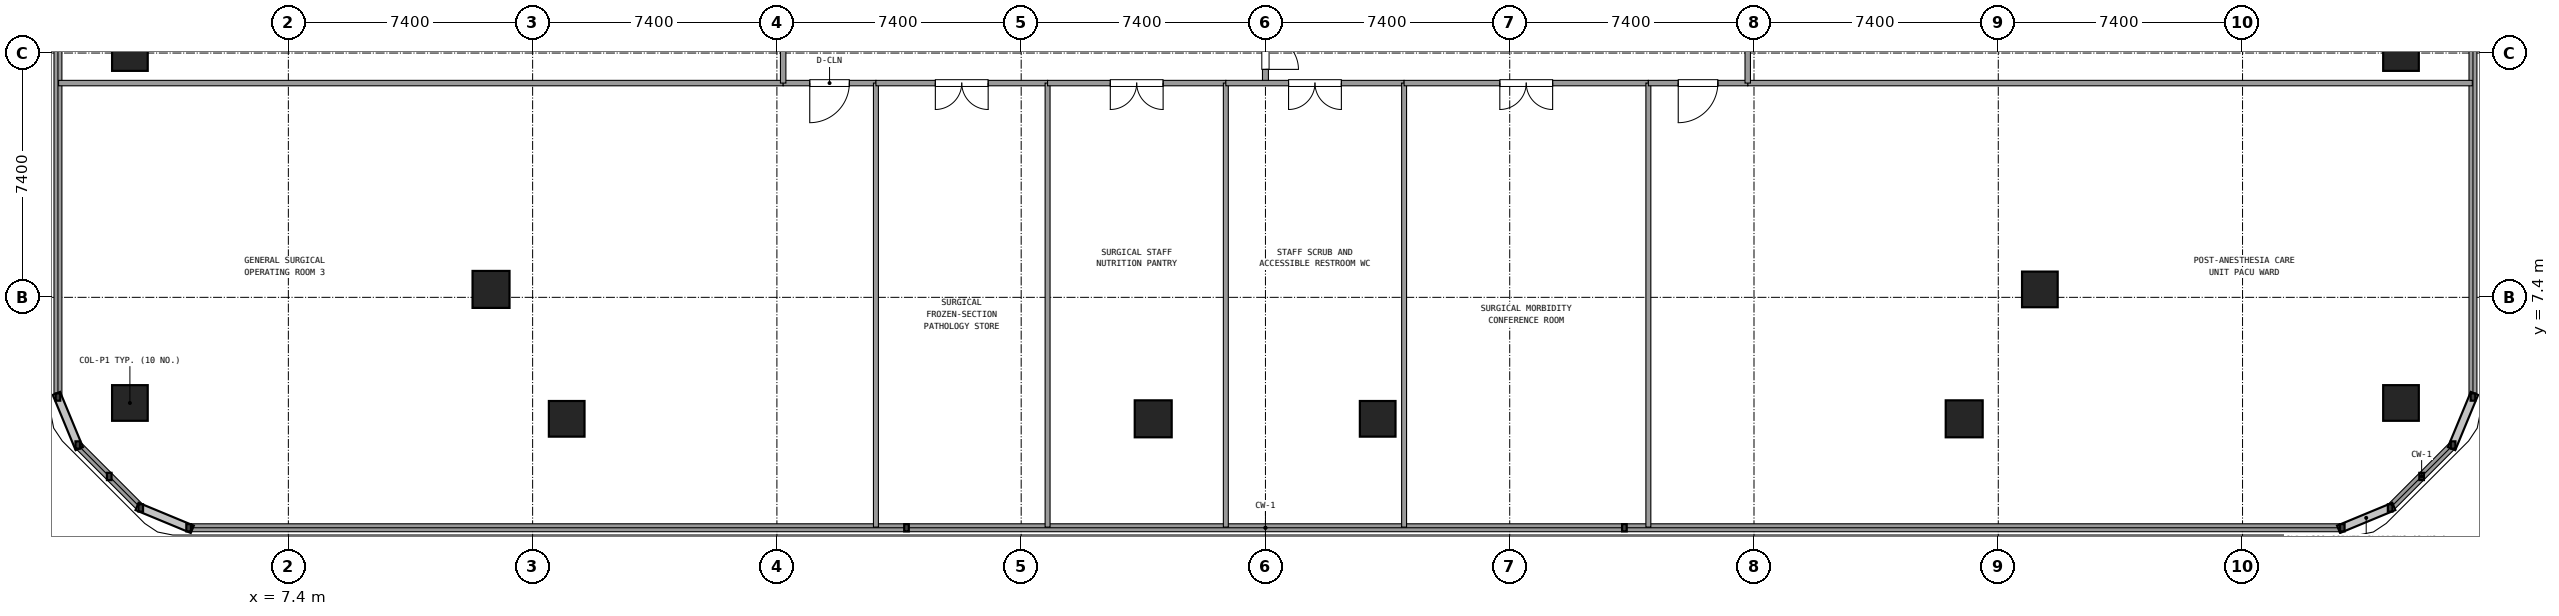
"""IFC4 building model, lengths in metres.
Left out: names, types, materials, properties, quantities, classifications, styles, units other than length and angle.
Written with IfcOpenShell. Run it as: python <this file> out.ifc"""

import sys

from ifc_helpers import new_model, si_unit, direction, frame, frame_2d, origin, origin_2d, place, context, subcontext, project, spatial, rectangle, circle, extrude, element, fill, save


model = new_model("IFC4")
c1 = context("Model", 3, precision=1e-05, world=origin(), true_north=direction((0.0, 1.0)))
c2 = subcontext(c1, "Body", "Model", "MODEL_VIEW")
j1 = project(units=[si_unit("LENGTHUNIT", "METRE"), si_unit("PLANEANGLEUNIT", "RADIAN")], contexts=[c1])
p1 = place(None, origin())
s1 = spatial("IfcSite", under=j1, at=p1, CompositionType="ELEMENT")
p2 = place(p1, origin())
s2 = spatial("IfcBuilding", under=s1, at=p2, CompositionType="ELEMENT")
p3 = place(p2, frame((0.0, 0.0, 18.9)))
s3 = spatial("IfcBuildingStorey", under=s2, at=p3, CompositionType="ELEMENT", Elevation=18.9)
p4 = place(p3, frame((13.54, 7.64, 0.0), z_axis=(0.0, 0.0, 1.0), x_axis=(1.0, 0.0, 0.0)))
e1 = element("IfcColumn", 1, at=p4, inside=s3, PredefinedType="COLUMN", context=c2, shape_type="SweptSolid", body=[
    extrude(circle(Radius=0.56, at=origin_2d()), origin(), (0.0, 0.0, 1.0), 5.04),
])
p5 = place(p3, frame((15.832, 3.72, 0.0), z_axis=(0.0, 0.0, 1.0), x_axis=(1.0, 0.0, 0.0)))
e2 = element("IfcColumn", 2, at=p5, inside=s3, PredefinedType="COLUMN", context=c2, shape_type="SweptSolid", body=[
    extrude(rectangle(XDim=1.08, YDim=1.08, at=origin_2d()), origin(), (0.0, 0.0, 1.0), 5.04),
])
p6 = place(p3, frame((33.6, 3.72, 0.0), z_axis=(0.0, 0.0, 1.0), x_axis=(1.0, 0.0, 0.0)))
e3 = element("IfcColumn", 3, at=p6, inside=s3, PredefinedType="COLUMN", context=c2, shape_type="SweptSolid", body=[
    extrude(circle(Radius=0.56, at=origin_2d()), origin(), (0.0, 0.0, 1.0), 5.04),
])
p7 = place(p3, frame((40.4, 3.72, 0.0), z_axis=(0.0, 0.0, 1.0), x_axis=(1.0, 0.0, 0.0)))
e4 = element("IfcColumn", 4, at=p7, inside=s3, PredefinedType="COLUMN", context=c2, shape_type="SweptSolid", body=[
    extrude(rectangle(XDim=1.08, YDim=1.08, at=origin_2d()), origin(), (0.0, 0.0, 1.0), 5.04),
])
p8 = place(p3, frame((58.168, 3.72, 0.0), z_axis=(0.0, 0.0, 1.0), x_axis=(1.0, 0.0, 0.0)))
e5 = element("IfcColumn", 5, at=p8, inside=s3, PredefinedType="COLUMN", context=c2, shape_type="SweptSolid", body=[
    extrude(circle(Radius=0.56, at=origin_2d()), origin(), (0.0, 0.0, 1.0), 5.04),
])
for number, where, z_axis, x_axis in (
    (6, (60.46, 7.64, 0.0), (0.0, 0.0, 1.0), (1.0, 0.0, 0.0)),
    (7, (2.6, 4.2, 0.0), (0.0, 0.0, 1.0), (1.0, 0.0, 0.0)),
    (8, (2.6, 14.8, 0.0), (0.0, 0.0, 1.0), (1.0, 0.0, 0.0)),
    (9, (71.4, 4.2, 0.0), (0.0, 0.0, 1.0), (1.0, 0.0, 0.0)),
    (10, (71.4, 14.8, 0.0), (0.0, 0.0, 1.0), (1.0, 0.0, 0.0)),
):
    element("IfcColumn", number, at=place(p3, frame(where, z_axis=z_axis, x_axis=x_axis)), inside=s3, PredefinedType="COLUMN", context=c2, shape_type="SweptSolid", body=[
        extrude(rectangle(XDim=1.08, YDim=1.08, at=origin_2d()), origin(), (0.0, 0.0, 1.0), 5.04),
    ])
p9 = place(p3, frame((4.379, 0.42, 0.0), z_axis=(0.0, 0.0, 1.0), x_axis=(1.0, 0.0, 0.0)))
e11 = element("IfcWall", 11, at=p9, inside=s3, PredefinedType="SOLIDWALL", context=c2, shape_type="SweptSolid", body=[
    extrude(rectangle(XDim=65.242, YDim=0.24, at=frame_2d((32.621, 0.0))), origin(), (0.0, 0.0, 1.0), 0.85),
])
p10 = place(p3, frame((71.072, 1.021, 0.0), z_axis=(0.0, 0.0, 1.0), x_axis=(0.707106781187, 0.707106781187, 0.0)))
e12 = element("IfcWall", 12, at=p10, inside=s3, PredefinedType="SOLIDWALL", context=c2, shape_type="SweptSolid", body=[
    extrude(rectangle(XDim=2.697, YDim=0.24, at=frame_2d((1.348, 0.0))), origin(), (0.0, 0.0, 1.0), 0.85),
])
for number, where, z_axis, x_axis in (
    (13, (73.58, 4.379, 0.0), (0.0, 0.0, 1.0), (0.0, 1.0, 0.0)),
    (14, (0.42, 47.421, 0.0), (0.0, 0.0, 1.0), (0.0, -1.0, 0.0)),
):
    element("IfcWall", number, at=place(p3, frame(where, z_axis=z_axis, x_axis=x_axis)), inside=s3, PredefinedType="SOLIDWALL", context=c2, shape_type="SweptSolid", body=[
        extrude(rectangle(XDim=43.042, YDim=0.24, at=frame_2d((21.521, 0.0))), origin(), (0.0, 0.0, 1.0), 0.85),
    ])
p11 = place(p3, frame((1.021, 2.928, 0.0), z_axis=(0.0, 0.0, 1.0), x_axis=(0.707106781187, -0.707106781187, 0.0)))
e15 = element("IfcWall", 15, at=p11, inside=s3, PredefinedType="SOLIDWALL", context=c2, shape_type="SweptSolid", body=[
    extrude(rectangle(XDim=2.697, YDim=0.24, at=frame_2d((1.348, 0.0))), origin(), (0.0, 0.0, 1.0), 0.85),
])
p12 = place(p3, frame((37.0, 13.89, 0.0), z_axis=(0.0, 0.0, 1.0), x_axis=(0.0, 1.0, 0.0)))
e16 = element("IfcWall", 16, at=p12, inside=s3, PredefinedType="PARTITIONING", context=c2, shape_type="SweptSolid", body=[
    extrude(rectangle(XDim=2.83, YDim=0.18, at=frame_2d((1.415, 0.0))), origin(), (0.0, 0.0, 1.0), 3.13),
])
p13 = place(p12, frame((0.415, 0.0, 0.0)))
e17 = element("IfcOpeningElement", 17, at=p13, cuts=e16, PredefinedType="OPENING", context=c2, shape_type="SweptSolid", body=[
    extrude(rectangle(XDim=2.0, YDim=2.2, at=frame_2d((1.0, 1.1))), frame((0.0, 0.1, 0.0), z_axis=(0.0, -1.0, 0.0), x_axis=(1.0, 0.0, 0.0)), (0.0, 0.0, 1.0), 0.2),
])
for number, where, z_axis, x_axis in (
    (18, (0.44, 13.89, 0.0), (0.0, 0.0, 1.0), (1.0, 0.0, 0.0)),
    (19, (51.61, 13.89, 0.0), (0.0, 0.0, 1.0), (1.0, 0.0, 0.0)),
):
    element("IfcWall", number, at=place(p3, frame(where, z_axis=z_axis, x_axis=x_axis)), inside=s3, PredefinedType="PARTITIONING", context=c2, shape_type="SweptSolid", body=[
        extrude(rectangle(XDim=21.95, YDim=0.165, at=frame_2d((10.975, 0.0))), origin(), (0.0, 0.0, 1.0), 3.13),
    ])
p14 = place(p3, frame((22.39, 13.89, 0.0), z_axis=(0.0, 0.0, 1.0), x_axis=(1.0, 0.0, 0.0)))
e20 = element("IfcWall", 20, at=p14, inside=s3, PredefinedType="PARTITIONING", context=c2, shape_type="SweptSolid", body=[
    extrude(rectangle(XDim=2.81, YDim=0.165, at=frame_2d((1.405, 0.0))), origin(), (0.0, 0.0, 1.0), 3.13),
])
p15 = place(p14, frame((0.805, 0.0, 0.0)))
e21 = element("IfcOpeningElement", 21, at=p15, cuts=e20, PredefinedType="OPENING", context=c2, shape_type="SweptSolid", body=[
    extrude(rectangle(XDim=1.2, YDim=2.15, at=frame_2d((0.6, 1.075))), frame((0.0, 0.093, 0.0), z_axis=(0.0, -1.0, 0.0), x_axis=(1.0, 0.0, 0.0)), (0.0, 0.0, 1.0), 0.185),
])
p16 = place(p3, frame((25.2, 0.44, 0.0), z_axis=(0.0, 0.0, 1.0), x_axis=(0.0, 1.0, 0.0)))
e22 = element("IfcWall", 22, at=p16, inside=s3, PredefinedType="PARTITIONING", context=c2, shape_type="SweptSolid", body=[
    extrude(rectangle(XDim=13.45, YDim=0.15, at=frame_2d((6.725, 0.0))), origin(), (0.0, 0.0, 1.0), 3.13),
])
p17 = place(p3, frame((25.2, 13.89, 0.0), z_axis=(0.0, 0.0, 1.0), x_axis=(1.0, 0.0, 0.0)))
e23 = element("IfcWall", 23, at=p17, inside=s3, PredefinedType="PARTITIONING", context=c2, shape_type="SweptSolid", body=[
    extrude(rectangle(XDim=5.2, YDim=0.165, at=frame_2d((2.6, 0.0))), origin(), (0.0, 0.0, 1.0), 3.13),
])
p18 = place(p17, frame((1.8, 0.0, 0.0)))
e24 = element("IfcOpeningElement", 24, at=p18, cuts=e23, PredefinedType="OPENING", context=c2, shape_type="SweptSolid", body=[
    extrude(rectangle(XDim=1.6, YDim=2.2, at=frame_2d((0.8, 1.1))), frame((0.0, 0.093, 0.0), z_axis=(0.0, -1.0, 0.0), x_axis=(1.0, 0.0, 0.0)), (0.0, 0.0, 1.0), 0.185),
])
p19 = place(p3, frame((30.4, 0.44, 0.0), z_axis=(0.0, 0.0, 1.0), x_axis=(0.0, 1.0, 0.0)))
e25 = element("IfcWall", 25, at=p19, inside=s3, PredefinedType="PARTITIONING", context=c2, shape_type="SweptSolid", body=[
    extrude(rectangle(XDim=13.45, YDim=0.15, at=frame_2d((6.725, 0.0))), origin(), (0.0, 0.0, 1.0), 3.13),
])
p20 = place(p3, frame((30.4, 13.89, 0.0), z_axis=(0.0, 0.0, 1.0), x_axis=(1.0, 0.0, 0.0)))
e26 = element("IfcWall", 26, at=p20, inside=s3, PredefinedType="PARTITIONING", context=c2, shape_type="SweptSolid", body=[
    extrude(rectangle(XDim=5.4, YDim=0.165, at=frame_2d((2.7, 0.0))), origin(), (0.0, 0.0, 1.0), 3.13),
])
p21 = place(p20, frame((1.9, 0.0, 0.0)))
e27 = element("IfcOpeningElement", 27, at=p21, cuts=e26, PredefinedType="OPENING", context=c2, shape_type="SweptSolid", body=[
    extrude(rectangle(XDim=1.6, YDim=2.2, at=frame_2d((0.8, 1.1))), frame((0.0, 0.093, 0.0), z_axis=(0.0, -1.0, 0.0), x_axis=(1.0, 0.0, 0.0)), (0.0, 0.0, 1.0), 0.185),
])
p22 = place(p3, frame((35.8, 0.44, 0.0), z_axis=(0.0, 0.0, 1.0), x_axis=(0.0, 1.0, 0.0)))
e28 = element("IfcWall", 28, at=p22, inside=s3, PredefinedType="PARTITIONING", context=c2, shape_type="SweptSolid", body=[
    extrude(rectangle(XDim=13.45, YDim=0.15, at=frame_2d((6.725, 0.0))), origin(), (0.0, 0.0, 1.0), 3.13),
])
p23 = place(p3, frame((35.8, 13.89, 0.0), z_axis=(0.0, 0.0, 1.0), x_axis=(1.0, 0.0, 0.0)))
e29 = element("IfcWall", 29, at=p23, inside=s3, PredefinedType="PARTITIONING", context=c2, shape_type="SweptSolid", body=[
    extrude(rectangle(XDim=5.4, YDim=0.165, at=frame_2d((2.7, 0.0))), origin(), (0.0, 0.0, 1.0), 3.13),
])
p24 = place(p23, frame((1.9, 0.0, 0.0)))
e30 = element("IfcOpeningElement", 30, at=p24, cuts=e29, PredefinedType="OPENING", context=c2, shape_type="SweptSolid", body=[
    extrude(rectangle(XDim=1.6, YDim=2.2, at=frame_2d((0.8, 1.1))), frame((0.0, 0.093, 0.0), z_axis=(0.0, -1.0, 0.0), x_axis=(1.0, 0.0, 0.0)), (0.0, 0.0, 1.0), 0.185),
])
p25 = place(p3, frame((41.2, 0.44, 0.0), z_axis=(0.0, 0.0, 1.0), x_axis=(0.0, 1.0, 0.0)))
e31 = element("IfcWall", 31, at=p25, inside=s3, PredefinedType="PARTITIONING", context=c2, shape_type="SweptSolid", body=[
    extrude(rectangle(XDim=13.45, YDim=0.15, at=frame_2d((6.725, 0.0))), origin(), (0.0, 0.0, 1.0), 3.13),
])
p26 = place(p3, frame((41.2, 13.89, 0.0), z_axis=(0.0, 0.0, 1.0), x_axis=(1.0, 0.0, 0.0)))
e32 = element("IfcWall", 32, at=p26, inside=s3, PredefinedType="PARTITIONING", context=c2, shape_type="SweptSolid", body=[
    extrude(rectangle(XDim=7.4, YDim=0.165, at=frame_2d((3.7, 0.0))), origin(), (0.0, 0.0, 1.0), 3.13),
])
p27 = place(p26, frame((2.9, 0.0, 0.0)))
e33 = element("IfcOpeningElement", 33, at=p27, cuts=e32, PredefinedType="OPENING", context=c2, shape_type="SweptSolid", body=[
    extrude(rectangle(XDim=1.6, YDim=2.2, at=frame_2d((0.8, 1.1))), frame((0.0, 0.093, 0.0), z_axis=(0.0, -1.0, 0.0), x_axis=(1.0, 0.0, 0.0)), (0.0, 0.0, 1.0), 0.185),
])
p28 = place(p3, frame((48.6, 0.44, 0.0), z_axis=(0.0, 0.0, 1.0), x_axis=(0.0, 1.0, 0.0)))
e34 = element("IfcWall", 34, at=p28, inside=s3, PredefinedType="PARTITIONING", context=c2, shape_type="SweptSolid", body=[
    extrude(rectangle(XDim=13.45, YDim=0.15, at=frame_2d((6.725, 0.0))), origin(), (0.0, 0.0, 1.0), 3.13),
])
p29 = place(p3, frame((48.6, 13.89, 0.0), z_axis=(0.0, 0.0, 1.0), x_axis=(1.0, 0.0, 0.0)))
e35 = element("IfcWall", 35, at=p29, inside=s3, PredefinedType="PARTITIONING", context=c2, shape_type="SweptSolid", body=[
    extrude(rectangle(XDim=3.01, YDim=0.165, at=frame_2d((1.505, 0.0))), origin(), (0.0, 0.0, 1.0), 3.13),
])
p30 = place(p29, frame((0.905, 0.0, 0.0)))
e36 = element("IfcOpeningElement", 36, at=p30, cuts=e35, PredefinedType="OPENING", context=c2, shape_type="SweptSolid", body=[
    extrude(rectangle(XDim=1.2, YDim=2.15, at=frame_2d((0.6, 1.075))), frame((0.0, 0.093, 0.0), z_axis=(0.0, -1.0, 0.0), x_axis=(1.0, 0.0, 0.0)), (0.0, 0.0, 1.0), 0.185),
])
p31 = place(p3, frame((22.39, 13.89, 0.0), z_axis=(0.0, 0.0, 1.0), x_axis=(0.0, 1.0, 0.0)))
e37 = element("IfcWall", 37, at=p31, inside=s3, PredefinedType="PARTITIONING", context=c2, shape_type="SweptSolid", body=[
    extrude(rectangle(XDim=4.28, YDim=0.165, at=frame_2d((2.14, 0.0))), origin(), (0.0, 0.0, 1.0), 3.13),
])
p32 = place(p31, frame((1.34, 0.0, 0.0)))
e38 = element("IfcOpeningElement", 38, at=p32, cuts=e37, PredefinedType="OPENING", context=c2, shape_type="SweptSolid", body=[
    extrude(rectangle(XDim=1.6, YDim=2.2, at=frame_2d((0.8, 1.1))), frame((0.0, 0.093, 0.0), z_axis=(0.0, -1.0, 0.0), x_axis=(1.0, 0.0, 0.0)), (0.0, 0.0, 1.0), 0.185),
])
p33 = place(p3, frame((51.61, 13.89, 0.0), z_axis=(0.0, 0.0, 1.0), x_axis=(0.0, 1.0, 0.0)))
e39 = element("IfcWall", 39, at=p33, inside=s3, PredefinedType="PARTITIONING", context=c2, shape_type="SweptSolid", body=[
    extrude(rectangle(XDim=4.28, YDim=0.165, at=frame_2d((2.14, 0.0))), origin(), (0.0, 0.0, 1.0), 3.13),
])
p34 = place(p33, frame((1.34, 0.0, 0.0)))
e40 = element("IfcOpeningElement", 40, at=p34, cuts=e39, PredefinedType="OPENING", context=c2, shape_type="SweptSolid", body=[
    extrude(rectangle(XDim=1.6, YDim=2.2, at=frame_2d((0.8, 1.1))), frame((0.0, 0.093, 0.0), z_axis=(0.0, -1.0, 0.0), x_axis=(1.0, 0.0, 0.0)), (0.0, 0.0, 1.0), 0.185),
])
p35 = place(p13, frame((2.0, 0.0, 0.0), z_axis=(0.0, 0.0, 1.0), x_axis=(-1.0, 0.0, 0.0)))
e41 = element("IfcDoor", 41, at=p35, inside=s3, OperationType="DOUBLE_DOOR_SINGLE_SWING", PredefinedType="DOOR", context=c2, shape_type="SweptSolid", body=[
    extrude(rectangle(XDim=2.0, YDim=2.2, at=frame_2d((1.0, 1.1))), frame((0.0, 0.025, 0.0), z_axis=(0.0, -1.0, 0.0), x_axis=(1.0, 0.0, 0.0)), (0.0, 0.0, 1.0), 0.05),
])
fill(e17, e41)
p36 = place(p15, frame((1.2, 0.0, 0.0), z_axis=(0.0, 0.0, 1.0), x_axis=(-1.0, 0.0, 0.0)))
e42 = element("IfcDoor", 42, at=p36, inside=s3, OperationType="SINGLE_SWING_LEFT", PredefinedType="DOOR", context=c2, shape_type="SweptSolid", body=[
    extrude(rectangle(XDim=1.2, YDim=2.15, at=frame_2d((0.6, 1.075))), frame((0.0, 0.025, 0.0), z_axis=(0.0, -1.0, 0.0), x_axis=(1.0, 0.0, 0.0)), (0.0, 0.0, 1.0), 0.05),
])
fill(e21, e42)
p37 = place(p18, frame((1.6, 0.0, 0.0), z_axis=(0.0, 0.0, 1.0), x_axis=(-1.0, 0.0, 0.0)))
e43 = element("IfcDoor", 43, at=p37, inside=s3, OperationType="DOUBLE_DOOR_SINGLE_SWING", PredefinedType="DOOR", context=c2, shape_type="SweptSolid", body=[
    extrude(rectangle(XDim=1.6, YDim=2.2, at=frame_2d((0.8, 1.1))), frame((0.0, 0.025, 0.0), z_axis=(0.0, -1.0, 0.0), x_axis=(1.0, 0.0, 0.0)), (0.0, 0.0, 1.0), 0.05),
])
fill(e24, e43)
p38 = place(p21, frame((1.6, 0.0, 0.0), z_axis=(0.0, 0.0, 1.0), x_axis=(-1.0, 0.0, 0.0)))
e44 = element("IfcDoor", 44, at=p38, inside=s3, OperationType="DOUBLE_DOOR_SINGLE_SWING", PredefinedType="DOOR", context=c2, shape_type="SweptSolid", body=[
    extrude(rectangle(XDim=1.6, YDim=2.2, at=frame_2d((0.8, 1.1))), frame((0.0, 0.025, 0.0), z_axis=(0.0, -1.0, 0.0), x_axis=(1.0, 0.0, 0.0)), (0.0, 0.0, 1.0), 0.05),
])
fill(e27, e44)
p39 = place(p24, frame((1.6, 0.0, 0.0), z_axis=(0.0, 0.0, 1.0), x_axis=(-1.0, 0.0, 0.0)))
e45 = element("IfcDoor", 45, at=p39, inside=s3, OperationType="DOUBLE_DOOR_SINGLE_SWING", PredefinedType="DOOR", context=c2, shape_type="SweptSolid", body=[
    extrude(rectangle(XDim=1.6, YDim=2.2, at=frame_2d((0.8, 1.1))), frame((0.0, 0.025, 0.0), z_axis=(0.0, -1.0, 0.0), x_axis=(1.0, 0.0, 0.0)), (0.0, 0.0, 1.0), 0.05),
])
fill(e30, e45)
p40 = place(p27, frame((1.6, 0.0, 0.0), z_axis=(0.0, 0.0, 1.0), x_axis=(-1.0, 0.0, 0.0)))
e46 = element("IfcDoor", 46, at=p40, inside=s3, OperationType="DOUBLE_DOOR_SINGLE_SWING", PredefinedType="DOOR", context=c2, shape_type="SweptSolid", body=[
    extrude(rectangle(XDim=1.6, YDim=2.2, at=frame_2d((0.8, 1.1))), frame((0.0, 0.025, 0.0), z_axis=(0.0, -1.0, 0.0), x_axis=(1.0, 0.0, 0.0)), (0.0, 0.0, 1.0), 0.05),
])
fill(e33, e46)
p41 = place(p30, frame((1.2, 0.0, 0.0), z_axis=(0.0, 0.0, 1.0), x_axis=(-1.0, 0.0, 0.0)))
e47 = element("IfcDoor", 47, at=p41, inside=s3, OperationType="SINGLE_SWING_LEFT", PredefinedType="DOOR", context=c2, shape_type="SweptSolid", body=[
    extrude(rectangle(XDim=1.2, YDim=2.15, at=frame_2d((0.6, 1.075))), frame((0.0, 0.025, 0.0), z_axis=(0.0, -1.0, 0.0), x_axis=(1.0, 0.0, 0.0)), (0.0, 0.0, 1.0), 0.05),
])
fill(e36, e47)
save(model, sys.argv[1])
